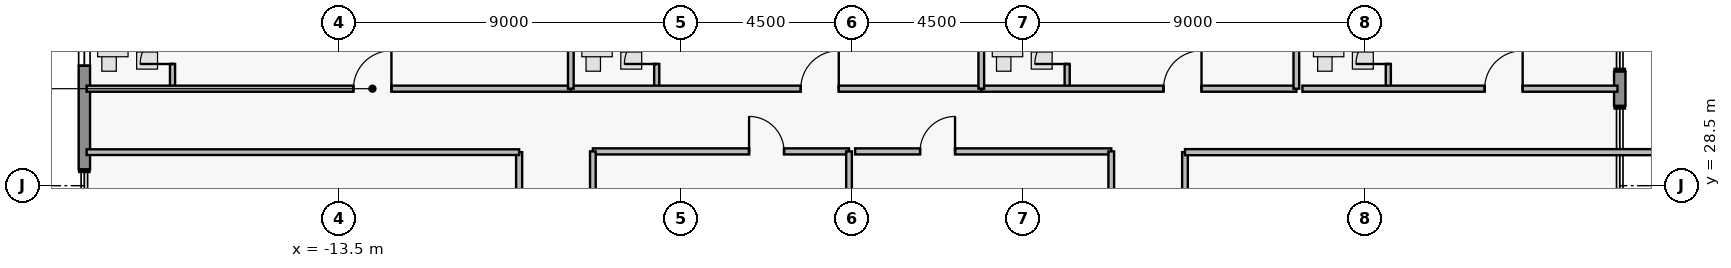
"""IFC4 building model, lengths in metres.
Left out: names, types, materials, properties, quantities, classifications, styles, units other than length and angle.
Written with IfcOpenShell. Run it as: python <this file> out.ifc"""

import sys

from ifc_helpers import new_model, si_unit, direction, frame, frame_2d, origin, place, context, subcontext, project, spatial, rectangle, extrude, element, fill, save


model = new_model("IFC4")
c1 = context("Model", 3, precision=1e-05, world=origin(), true_north=direction((0.0, 1.0)))
c2 = subcontext(c1, "Body", "Model", "MODEL_VIEW")
j1 = project(units=[si_unit("LENGTHUNIT", "METRE"), si_unit("PLANEANGLEUNIT", "RADIAN")], contexts=[c1])
p1 = place(None, origin())
s1 = spatial("IfcSite", under=j1, at=p1, CompositionType="ELEMENT")
p2 = place(p1, origin())
s2 = spatial("IfcBuilding", under=s1, at=p2, CompositionType="ELEMENT")
p3 = place(p2, frame((0.0, 0.0, 265.55)))
s3 = spatial("IfcBuildingStorey", under=s2, at=p3, CompositionType="ELEMENT", Elevation=265.55)
p4 = place(p3, frame((-20.2, 28.93, 0.0), z_axis=(0.0, 0.0, 1.0), x_axis=(0.0, 1.0, 0.0)))
e1 = element("IfcWall", 1, at=p4, inside=s3, PredefinedType="STANDARD", context=c2, shape_type="SweptSolid", body=[
    extrude(rectangle(XDim=6.67, YDim=0.3, at=frame_2d((3.335, 0.0))), origin(), (0.0, 0.0, 1.0), 3.48),
])
p5 = place(p4, frame((2.725, 0.0, 0.95)))
e2 = element("IfcOpeningElement", 2, at=p5, cuts=e1, PredefinedType="OPENING", context=c2, shape_type="SweptSolid", body=[
    extrude(rectangle(XDim=1.15, YDim=1.55, at=frame_2d((0.575, 0.775))), frame((0.0, 0.16, 0.0), z_axis=(0.0, -1.0, 0.0), x_axis=(1.0, 0.0, 0.0)), (0.0, 0.0, 1.0), 0.32),
])
p6 = place(p4, frame((4.94, 0.0, 0.95)))
e3 = element("IfcOpeningElement", 3, at=p6, cuts=e1, PredefinedType="OPENING", context=c2, shape_type="SweptSolid", body=[
    extrude(rectangle(XDim=1.15, YDim=1.55, at=frame_2d((0.575, 0.775))), frame((0.0, 0.16, 0.0), z_axis=(0.0, -1.0, 0.0), x_axis=(1.0, 0.0, 0.0)), (0.0, 0.0, 1.0), 0.32),
])
p7 = place(p3, frame((20.2, 31.5, 0.0), z_axis=(0.0, 0.0, 1.0), x_axis=(0.0, -1.0, 0.0)))
e4 = element("IfcWall", 4, at=p7, inside=s3, PredefinedType="STANDARD", context=c2, shape_type="SweptSolid", body=[
    extrude(rectangle(XDim=0.9, YDim=0.3, at=frame_2d((0.45, 0.0))), origin(), (0.0, 0.0, 1.0), 3.48),
])
p8 = place(p3, frame((-17.88, 31.05, 0.0), z_axis=(0.0, 0.0, 1.0), x_axis=(0.0, 1.0, 0.0)))
e5 = element("IfcWall", 5, at=p8, inside=s3, PredefinedType="PLUMBINGWALL", context=c2, shape_type="SweptSolid", body=[
    extrude(rectangle(XDim=2.36, YDim=0.135, at=frame_2d((1.18, 0.0))), origin(), (0.0, 0.0, 1.0), 3.48),
])
p9 = place(p8, frame((0.65, 0.0, 0.0)))
e6 = element("IfcOpeningElement", 6, at=p9, cuts=e5, PredefinedType="OPENING", context=c2, shape_type="SweptSolid", body=[
    extrude(rectangle(XDim=0.85, YDim=2.1, at=frame_2d((0.425, 1.05))), frame((0.0, 0.077, 0.0), z_axis=(0.0, -1.0, 0.0), x_axis=(1.0, 0.0, 0.0)), (0.0, 0.0, 1.0), 0.155),
])
p10 = place(p3, frame((-20.14, 31.05, 0.0), z_axis=(0.0, 0.0, 1.0), x_axis=(1.0, 0.0, 0.0)))
e7 = element("IfcWall", 7, at=p10, inside=s3, PredefinedType="PARTITIONING", context=c2, shape_type="SweptSolid", body=[
    extrude(rectangle(XDim=12.74, YDim=0.16, at=frame_2d((6.37, 0.0))), origin(), (0.0, 0.0, 1.0), 3.48),
])
p11 = place(p10, frame((7.02, 0.0, 0.0)))
e8 = element("IfcOpeningElement", 8, at=p11, cuts=e7, PredefinedType="OPENING", context=c2, shape_type="SweptSolid", body=[
    extrude(rectangle(XDim=1.0, YDim=2.15, at=frame_2d((0.5, 1.075))), frame((0.0, 0.09, 0.0), z_axis=(0.0, -1.0, 0.0), x_axis=(1.0, 0.0, 0.0)), (0.0, 0.0, 1.0), 0.18),
])
p12 = place(p3, frame((-5.14, 31.05, 0.0), z_axis=(0.0, 0.0, 1.0), x_axis=(0.0, 1.0, 0.0)))
e9 = element("IfcWall", 9, at=p12, inside=s3, PredefinedType="PLUMBINGWALL", context=c2, shape_type="SweptSolid", body=[
    extrude(rectangle(XDim=2.36, YDim=0.135, at=frame_2d((1.18, 0.0))), origin(), (0.0, 0.0, 1.0), 3.48),
])
p13 = place(p12, frame((0.65, 0.0, 0.0)))
e10 = element("IfcOpeningElement", 10, at=p13, cuts=e9, PredefinedType="OPENING", context=c2, shape_type="SweptSolid", body=[
    extrude(rectangle(XDim=0.85, YDim=2.1, at=frame_2d((0.425, 1.05))), frame((0.0, 0.077, 0.0), z_axis=(0.0, -1.0, 0.0), x_axis=(1.0, 0.0, 0.0)), (0.0, 0.0, 1.0), 0.155),
])
p14 = place(p3, frame((-7.4, 31.05, 0.0), z_axis=(0.0, 0.0, 1.0), x_axis=(1.0, 0.0, 0.0)))
e11 = element("IfcWall", 11, at=p14, inside=s3, PredefinedType="PARTITIONING", context=c2, shape_type="SweptSolid", body=[
    extrude(rectangle(XDim=10.8, YDim=0.16, at=frame_2d((5.4, 0.0))), origin(), (0.0, 0.0, 1.0), 3.48),
])
p15 = place(p14, frame((6.05, 0.0, 0.0)))
e12 = element("IfcOpeningElement", 12, at=p15, cuts=e11, PredefinedType="OPENING", context=c2, shape_type="SweptSolid", body=[
    extrude(rectangle(XDim=1.0, YDim=2.15, at=frame_2d((0.5, 1.075))), frame((0.0, 0.09, 0.0), z_axis=(0.0, -1.0, 0.0), x_axis=(1.0, 0.0, 0.0)), (0.0, 0.0, 1.0), 0.18),
])
p16 = place(p3, frame((5.66, 31.05, 0.0), z_axis=(0.0, 0.0, 1.0), x_axis=(0.0, 1.0, 0.0)))
e13 = element("IfcWall", 13, at=p16, inside=s3, PredefinedType="PLUMBINGWALL", context=c2, shape_type="SweptSolid", body=[
    extrude(rectangle(XDim=2.36, YDim=0.135, at=frame_2d((1.18, 0.0))), origin(), (0.0, 0.0, 1.0), 3.48),
])
p17 = place(p16, frame((0.65, 0.0, 0.0)))
e14 = element("IfcOpeningElement", 14, at=p17, cuts=e13, PredefinedType="OPENING", context=c2, shape_type="SweptSolid", body=[
    extrude(rectangle(XDim=0.85, YDim=2.1, at=frame_2d((0.425, 1.05))), frame((0.0, 0.077, 0.0), z_axis=(0.0, -1.0, 0.0), x_axis=(1.0, 0.0, 0.0)), (0.0, 0.0, 1.0), 0.155),
])
p18 = place(p3, frame((3.4, 31.05, 0.0), z_axis=(0.0, 0.0, 1.0), x_axis=(1.0, 0.0, 0.0)))
e15 = element("IfcWall", 15, at=p18, inside=s3, PredefinedType="PARTITIONING", context=c2, shape_type="SweptSolid", body=[
    extrude(rectangle(XDim=8.29, YDim=0.16, at=frame_2d((4.145, 0.0))), origin(), (0.0, 0.0, 1.0), 3.48),
])
p19 = place(p18, frame((4.795, 0.0, 0.0)))
e16 = element("IfcOpeningElement", 16, at=p19, cuts=e15, PredefinedType="OPENING", context=c2, shape_type="SweptSolid", body=[
    extrude(rectangle(XDim=1.0, YDim=2.15, at=frame_2d((0.5, 1.075))), frame((0.0, 0.09, 0.0), z_axis=(0.0, -1.0, 0.0), x_axis=(1.0, 0.0, 0.0)), (0.0, 0.0, 1.0), 0.18),
])
p20 = place(p3, frame((14.11, 31.05, 0.0), z_axis=(0.0, 0.0, 1.0), x_axis=(0.0, 1.0, 0.0)))
e17 = element("IfcWall", 17, at=p20, inside=s3, PredefinedType="PLUMBINGWALL", context=c2, shape_type="SweptSolid", body=[
    extrude(rectangle(XDim=2.36, YDim=0.135, at=frame_2d((1.18, 0.0))), origin(), (0.0, 0.0, 1.0), 2.362),
])
p21 = place(p20, frame((0.65, 0.0, 0.0)))
e18 = element("IfcOpeningElement", 18, at=p21, cuts=e17, PredefinedType="OPENING", context=c2, shape_type="SweptSolid", body=[
    extrude(rectangle(XDim=0.85, YDim=2.1, at=frame_2d((0.425, 1.05))), frame((0.0, 0.077, 0.0), z_axis=(0.0, -1.0, 0.0), x_axis=(1.0, 0.0, 0.0)), (0.0, 0.0, 1.0), 0.155),
])
p22 = place(p3, frame((11.85, 31.05, 0.0), z_axis=(0.0, 0.0, 1.0), x_axis=(1.0, 0.0, 0.0)))
e19 = element("IfcWall", 19, at=p22, inside=s3, PredefinedType="PARTITIONING", context=c2, shape_type="SweptSolid", body=[
    extrude(rectangle(XDim=8.29, YDim=0.16, at=frame_2d((4.145, 0.0))), origin(), (0.0, 0.0, 1.0), 3.48),
])
p23 = place(p22, frame((4.795, 0.0, 0.0)))
e20 = element("IfcOpeningElement", 20, at=p23, cuts=e19, PredefinedType="OPENING", context=c2, shape_type="SweptSolid", body=[
    extrude(rectangle(XDim=1.0, YDim=2.15, at=frame_2d((0.5, 1.075))), frame((0.0, 0.09, 0.0), z_axis=(0.0, -1.0, 0.0), x_axis=(1.0, 0.0, 0.0)), (0.0, 0.0, 1.0), 0.18),
])
p24 = place(p3, frame((-6.82, 29.4, 0.0), z_axis=(0.0, 0.0, 1.0), x_axis=(1.0, 0.0, 0.0)))
e21 = element("IfcWall", 21, at=p24, inside=s3, PredefinedType="PARTITIONING", context=c2, shape_type="SweptSolid", body=[
    extrude(rectangle(XDim=6.74, YDim=0.16, at=frame_2d((3.37, 0.0))), origin(), (0.0, 0.0, 1.0), 3.48),
])
p25 = place(p24, frame((4.11, 0.0, 0.0)))
e22 = element("IfcOpeningElement", 22, at=p25, cuts=e21, PredefinedType="OPENING", context=c2, shape_type="SweptSolid", body=[
    extrude(rectangle(XDim=0.92, YDim=2.12, at=frame_2d((0.46, 1.06))), frame((0.0, 0.09, 0.0), z_axis=(0.0, -1.0, 0.0), x_axis=(1.0, 0.0, 0.0)), (0.0, 0.0, 1.0), 0.18),
])
p26 = place(p3, frame((0.08, 29.4, 0.0), z_axis=(0.0, 0.0, 1.0), x_axis=(1.0, 0.0, 0.0)))
e23 = element("IfcWall", 23, at=p26, inside=s3, PredefinedType="PARTITIONING", context=c2, shape_type="SweptSolid", body=[
    extrude(rectangle(XDim=6.74, YDim=0.16, at=frame_2d((3.37, 0.0))), origin(), (0.0, 0.0, 1.0), 3.48),
])
p27 = place(p26, frame((1.71, 0.0, 0.0)))
e24 = element("IfcOpeningElement", 24, at=p27, cuts=e23, PredefinedType="OPENING", context=c2, shape_type="SweptSolid", body=[
    extrude(rectangle(XDim=0.92, YDim=2.12, at=frame_2d((0.46, 1.06))), frame((0.0, 0.09, 0.0), z_axis=(0.0, -1.0, 0.0), x_axis=(1.0, 0.0, 0.0)), (0.0, 0.0, 1.0), 0.18),
])
p28 = place(p3, frame((-8.76, 26.26, 0.0), z_axis=(0.0, 0.0, 1.0), x_axis=(0.0, 1.0, 0.0)))
e25 = element("IfcWall", 25, at=p28, inside=s3, PredefinedType="PARTITIONING", context=c2, shape_type="SweptSolid", body=[
    extrude(rectangle(XDim=3.12, YDim=0.16, at=frame_2d((1.56, 0.0))), origin(), (0.0, 0.0, 1.0), 3.48),
])
p29 = place(p28, frame((1.1, 0.0, 0.0)))
e26 = element("IfcOpeningElement", 26, at=p29, cuts=e25, PredefinedType="OPENING", context=c2, shape_type="SweptSolid", body=[
    extrude(rectangle(XDim=0.92, YDim=2.12, at=frame_2d((0.46, 1.06))), frame((0.0, 0.09, 0.0), z_axis=(0.0, -1.0, 0.0), x_axis=(1.0, 0.0, 0.0)), (0.0, 0.0, 1.0), 0.18),
])
for number, where, z_axis, x_axis in (
    (27, (-7.4, 31.05, 0.0), (0.0, 0.0, 1.0), (0.0, 1.0, 0.0)),
    (28, (3.4, 31.05, 0.0), (0.0, 0.0, 1.0), (0.0, 1.0, 0.0)),
    (29, (11.69, 31.05, 0.0), (0.0, 0.0, 1.0), (0.0, 1.0, 0.0)),
):
    element("IfcWall", number, at=place(p3, frame(where, z_axis=z_axis, x_axis=x_axis)), inside=s3, PredefinedType="PARTITIONING", context=c2, shape_type="SweptSolid", body=[
        extrude(rectangle(XDim=7.87, YDim=0.15, at=frame_2d((3.935, 0.0))), origin(), (0.0, 0.0, 1.0), 3.48),
    ])
for number, where, z_axis, x_axis in (
    (30, (-6.82, 27.0, 0.0), (0.0, 0.0, 1.0), (0.0, 1.0, 0.0)),
    (31, (-0.08, 27.0, 0.0), (0.0, 0.0, 1.0), (0.0, 1.0, 0.0)),
    (32, (6.82, 27.0, 0.0), (0.0, 0.0, 1.0), (0.0, 1.0, 0.0)),
):
    element("IfcWall", number, at=place(p3, frame(where, z_axis=z_axis, x_axis=x_axis)), inside=s3, PredefinedType="PARTITIONING", context=c2, shape_type="SweptSolid", body=[
        extrude(rectangle(XDim=2.4, YDim=0.15, at=frame_2d((1.2, 0.0))), origin(), (0.0, 0.0, 1.0), 3.48),
    ])
p30 = place(p3, frame((-20.14, 29.38, 0.0), z_axis=(0.0, 0.0, 1.0), x_axis=(1.0, 0.0, 0.0)))
e33 = element("IfcWall", 33, at=p30, inside=s3, PredefinedType="PARTITIONING", context=c2, shape_type="SweptSolid", body=[
    extrude(rectangle(XDim=11.38, YDim=0.15, at=frame_2d((5.69, 0.0))), origin(), (0.0, 0.0, 1.0), 3.48),
])
p31 = place(p3, frame((8.76, 16.7, 0.0), z_axis=(0.0, 0.0, 1.0), x_axis=(0.0, 1.0, 0.0)))
e34 = element("IfcWall", 34, at=p31, inside=s3, PredefinedType="PARTITIONING", context=c2, shape_type="SweptSolid", body=[
    extrude(rectangle(XDim=12.68, YDim=0.15, at=frame_2d((6.34, 0.0))), origin(), (0.0, 0.0, 1.0), 3.48),
])
p32 = place(p3, frame((8.76, 29.38, 0.0), z_axis=(0.0, 0.0, 1.0), x_axis=(1.0, 0.0, 0.0)))
e35 = element("IfcWall", 35, at=p32, inside=s3, PredefinedType="PARTITIONING", context=c2, shape_type="SweptSolid", body=[
    extrude(rectangle(XDim=13.88, YDim=0.16, at=frame_2d((6.94, 0.0))), origin(), (0.0, 0.0, 1.0), 3.48),
])
p33 = place(p5, origin())
e36 = element("IfcWindow", 36, at=p33, inside=s3, PartitioningType="SINGLE_PANEL", PredefinedType="WINDOW", context=c2, shape_type="SweptSolid", body=[
    extrude(rectangle(XDim=1.15, YDim=1.55, at=frame_2d((0.575, 0.775))), frame((0.0, 0.03, 0.0), z_axis=(0.0, -1.0, 0.0), x_axis=(1.0, 0.0, 0.0)), (0.0, 0.0, 1.0), 0.06),
])
fill(e2, e36)
p34 = place(p9, origin())
e37 = element("IfcDoor", 37, at=p34, inside=s3, OperationType="SINGLE_SWING_LEFT", PredefinedType="DOOR", context=c2, shape_type="SweptSolid", body=[
    extrude(rectangle(XDim=0.85, YDim=2.1, at=frame_2d((0.425, 1.05))), frame((0.0, 0.025, 0.0), z_axis=(0.0, -1.0, 0.0), x_axis=(1.0, 0.0, 0.0)), (0.0, 0.0, 1.0), 0.05),
])
fill(e6, e37)
p35 = place(p11, origin())
e38 = element("IfcDoor", 38, at=p35, inside=s3, OperationType="SINGLE_SWING_RIGHT", PredefinedType="DOOR", context=c2, shape_type="SweptSolid", body=[
    extrude(rectangle(XDim=1.0, YDim=2.15, at=frame_2d((0.5, 1.075))), frame((0.0, 0.025, 0.0), z_axis=(0.0, -1.0, 0.0), x_axis=(1.0, 0.0, 0.0)), (0.0, 0.0, 1.0), 0.05),
])
fill(e8, e38)
p36 = place(p13, origin())
e39 = element("IfcDoor", 39, at=p36, inside=s3, OperationType="SINGLE_SWING_LEFT", PredefinedType="DOOR", context=c2, shape_type="SweptSolid", body=[
    extrude(rectangle(XDim=0.85, YDim=2.1, at=frame_2d((0.425, 1.05))), frame((0.0, 0.025, 0.0), z_axis=(0.0, -1.0, 0.0), x_axis=(1.0, 0.0, 0.0)), (0.0, 0.0, 1.0), 0.05),
])
fill(e10, e39)
p37 = place(p15, origin())
e40 = element("IfcDoor", 40, at=p37, inside=s3, OperationType="SINGLE_SWING_RIGHT", PredefinedType="DOOR", context=c2, shape_type="SweptSolid", body=[
    extrude(rectangle(XDim=1.0, YDim=2.15, at=frame_2d((0.5, 1.075))), frame((0.0, 0.025, 0.0), z_axis=(0.0, -1.0, 0.0), x_axis=(1.0, 0.0, 0.0)), (0.0, 0.0, 1.0), 0.05),
])
fill(e12, e40)
p38 = place(p17, origin())
e41 = element("IfcDoor", 41, at=p38, inside=s3, OperationType="SINGLE_SWING_LEFT", PredefinedType="DOOR", context=c2, shape_type="SweptSolid", body=[
    extrude(rectangle(XDim=0.85, YDim=2.1, at=frame_2d((0.425, 1.05))), frame((0.0, 0.025, 0.0), z_axis=(0.0, -1.0, 0.0), x_axis=(1.0, 0.0, 0.0)), (0.0, 0.0, 1.0), 0.05),
])
fill(e14, e41)
p39 = place(p19, origin())
e42 = element("IfcDoor", 42, at=p39, inside=s3, OperationType="SINGLE_SWING_RIGHT", PredefinedType="DOOR", context=c2, shape_type="SweptSolid", body=[
    extrude(rectangle(XDim=1.0, YDim=2.15, at=frame_2d((0.5, 1.075))), frame((0.0, 0.025, 0.0), z_axis=(0.0, -1.0, 0.0), x_axis=(1.0, 0.0, 0.0)), (0.0, 0.0, 1.0), 0.05),
])
fill(e16, e42)
p40 = place(p21, origin())
e43 = element("IfcDoor", 43, at=p40, inside=s3, OperationType="SINGLE_SWING_LEFT", PredefinedType="DOOR", context=c2, shape_type="SweptSolid", body=[
    extrude(rectangle(XDim=0.85, YDim=2.1, at=frame_2d((0.425, 1.05))), frame((0.0, 0.025, 0.0), z_axis=(0.0, -1.0, 0.0), x_axis=(1.0, 0.0, 0.0)), (0.0, 0.0, 1.0), 0.05),
])
fill(e18, e43)
p41 = place(p23, origin())
e44 = element("IfcDoor", 44, at=p41, inside=s3, OperationType="SINGLE_SWING_RIGHT", PredefinedType="DOOR", context=c2, shape_type="SweptSolid", body=[
    extrude(rectangle(XDim=1.0, YDim=2.15, at=frame_2d((0.5, 1.075))), frame((0.0, 0.025, 0.0), z_axis=(0.0, -1.0, 0.0), x_axis=(1.0, 0.0, 0.0)), (0.0, 0.0, 1.0), 0.05),
])
fill(e20, e44)
p42 = place(p25, origin())
e45 = element("IfcDoor", 45, at=p42, inside=s3, OperationType="SINGLE_SWING_LEFT", PredefinedType="DOOR", context=c2, shape_type="SweptSolid", body=[
    extrude(rectangle(XDim=0.92, YDim=2.12, at=frame_2d((0.46, 1.06))), frame((0.0, 0.025, 0.0), z_axis=(0.0, -1.0, 0.0), x_axis=(1.0, 0.0, 0.0)), (0.0, 0.0, 1.0), 0.05),
])
fill(e22, e45)
p43 = place(p27, origin())
e46 = element("IfcDoor", 46, at=p43, inside=s3, OperationType="SINGLE_SWING_RIGHT", PredefinedType="DOOR", context=c2, shape_type="SweptSolid", body=[
    extrude(rectangle(XDim=0.92, YDim=2.12, at=frame_2d((0.46, 1.06))), frame((0.0, 0.025, 0.0), z_axis=(0.0, -1.0, 0.0), x_axis=(1.0, 0.0, 0.0)), (0.0, 0.0, 1.0), 0.05),
])
fill(e24, e46)
save(model, sys.argv[1])
